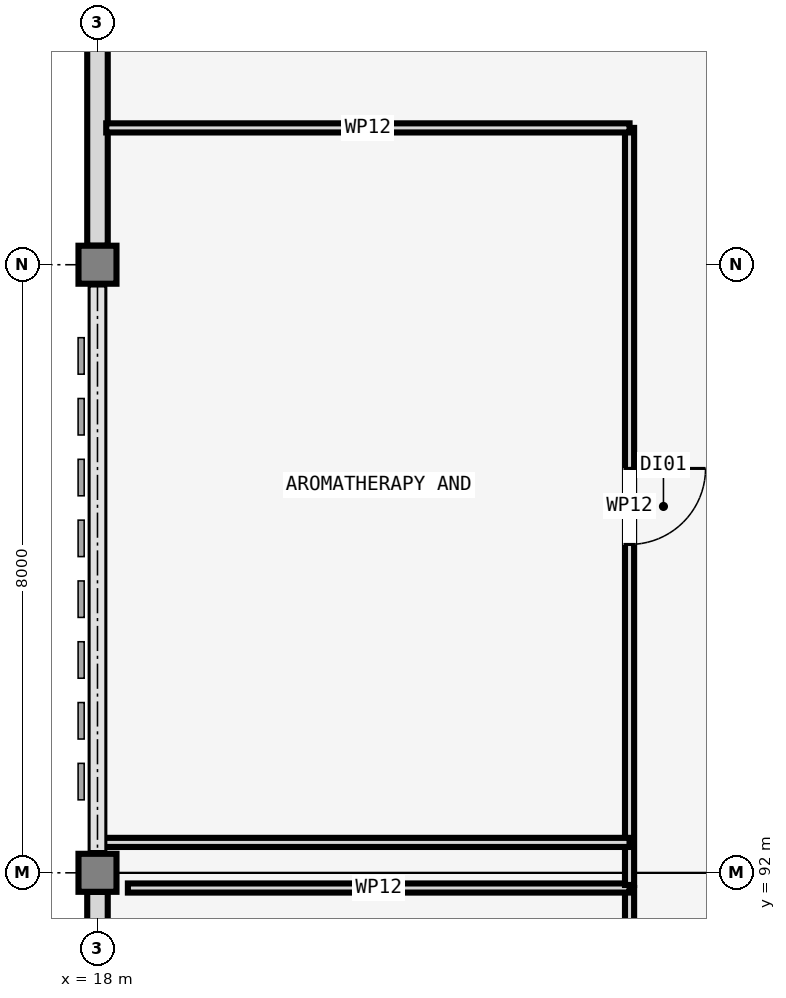
"""IFC4 building model, lengths in metres.
Left out: names, types, materials, properties, quantities, classifications, styles, units other than length and angle.
Written with IfcOpenShell. Run it as: python <this file> out.ifc"""

import sys

from ifc_helpers import new_model, si_unit, direction, frame, frame_2d, origin, origin_2d, place, context, subcontext, project, spatial, rectangle, extrude, element, fill, save


model = new_model("IFC4")
c1 = context("Model", 3, precision=1e-05, world=origin(), true_north=direction((0.0, 1.0)))
c2 = subcontext(c1, "Body", "Model", "MODEL_VIEW")
j1 = project(units=[si_unit("LENGTHUNIT", "METRE"), si_unit("PLANEANGLEUNIT", "RADIAN")], contexts=[c1])
p1 = place(None, origin())
s1 = spatial("IfcSite", under=j1, at=p1, CompositionType="ELEMENT")
p2 = place(p1, origin())
s2 = spatial("IfcBuilding", under=s1, at=p2, CompositionType="ELEMENT")
p3 = place(p2, frame((0.0, 0.0, 13.5)))
s3 = spatial("IfcBuildingStorey", under=s2, at=p3, CompositionType="ELEMENT", Elevation=13.5)
for number, where, z_axis, x_axis in (
    (1, (18.0, 92.0, 0.0), (0.0, 0.0, 1.0), (1.0, 0.0, 0.0)),
    (2, (18.0, 100.0, 0.0), (0.0, 0.0, 1.0), (1.0, 0.0, 0.0)),
):
    element("IfcColumn", number, at=place(p3, frame(where, z_axis=z_axis, x_axis=x_axis)), inside=s3, PredefinedType="COLUMN", context=c2, shape_type="SweptSolid", body=[
        extrude(rectangle(XDim=0.5, YDim=0.5, at=origin_2d()), origin(), (0.0, 0.0, 1.0), 4.2),
    ])
p4 = place(p3, frame((18.0, 91.75, 0.0), z_axis=(0.0, 0.0, 1.0), x_axis=(0.0, -1.0, 0.0)))
e3 = element("IfcWall", 3, at=p4, inside=s3, PredefinedType="SOLIDWALL", context=c2, shape_type="SweptSolid", body=[
    extrude(rectangle(XDim=7.5, YDim=0.27, at=frame_2d((3.75, 0.0))), origin(), (0.0, 0.0, 1.0), 3.24),
])
p5 = place(p4, frame((2.9, 0.0, 0.95)))
e4 = element("IfcOpeningElement", 4, at=p5, cuts=e3, PredefinedType="OPENING", context=c2, shape_type="SweptSolid", body=[
    extrude(rectangle(XDim=1.7, YDim=1.55, at=frame_2d((0.85, 0.775))), frame((0.0, 0.145, 0.0), z_axis=(0.0, -1.0, 0.0), x_axis=(1.0, 0.0, 0.0)), (0.0, 0.0, 1.0), 0.29),
])
p6 = place(p3, frame((18.0, 107.75, 0.0), z_axis=(0.0, 0.0, 1.0), x_axis=(0.0, -1.0, 0.0)))
e5 = element("IfcWall", 5, at=p6, inside=s3, PredefinedType="SOLIDWALL", context=c2, shape_type="SweptSolid", body=[
    extrude(rectangle(XDim=7.5, YDim=0.27, at=frame_2d((3.75, 0.0))), origin(), (0.0, 0.0, 1.0), 3.24),
])
p7 = place(p6, frame((2.9, 0.0, 0.95)))
e6 = element("IfcOpeningElement", 6, at=p7, cuts=e5, PredefinedType="OPENING", context=c2, shape_type="SweptSolid", body=[
    extrude(rectangle(XDim=1.7, YDim=1.55, at=frame_2d((0.85, 0.775))), frame((0.0, 0.145, 0.0), z_axis=(0.0, -1.0, 0.0), x_axis=(1.0, 0.0, 0.0)), (0.0, 0.0, 1.0), 0.29),
])
p8 = place(p3, frame((25.0, 91.8, 0.0), z_axis=(0.0, 0.0, 1.0), x_axis=(0.0, -1.0, 0.0)))
e7 = element("IfcWall", 7, at=p8, inside=s3, PredefinedType="PARTITIONING", context=c2, shape_type="SweptSolid", body=[
    extrude(rectangle(XDim=25.4, YDim=0.12, at=frame_2d((12.7, 0.0))), origin(), (0.0, 0.0, 1.0), 3.12),
])
p9 = place(p8, frame((12.2, 0.0, 0.0)))
e8 = element("IfcOpeningElement", 8, at=p9, cuts=e7, PredefinedType="OPENING", context=c2, shape_type="SweptSolid", body=[
    extrude(rectangle(XDim=1.0, YDim=2.1, at=frame_2d((0.5, 1.05))), frame((0.0, 0.07, 0.0), z_axis=(0.0, -1.0, 0.0), x_axis=(1.0, 0.0, 0.0)), (0.0, 0.0, 1.0), 0.14),
])
p10 = place(p3, frame((18.4, 91.8, 0.0), z_axis=(0.0, 0.0, 1.0), x_axis=(1.0, 0.0, 0.0)))
e9 = element("IfcWall", 9, at=p10, inside=s3, PredefinedType="PARTITIONING", context=c2, shape_type="SweptSolid", body=[
    extrude(rectangle(XDim=6.6, YDim=0.12, at=frame_2d((3.3, 0.0))), origin(), (0.0, 0.0, 1.0), 3.12),
])
p11 = place(p3, frame((25.0, 101.8, 0.0), z_axis=(0.0, 0.0, 1.0), x_axis=(0.0, -1.0, 0.0)))
e10 = element("IfcWall", 10, at=p11, inside=s3, PredefinedType="PARTITIONING", context=c2, shape_type="SweptSolid", body=[
    extrude(rectangle(XDim=9.96, YDim=0.12, at=frame_2d((4.98, 0.0))), origin(), (0.0, 0.0, 1.0), 3.12),
])
p12 = place(p11, frame((4.48, 0.0, 0.0)))
e11 = element("IfcOpeningElement", 11, at=p12, cuts=e10, PredefinedType="OPENING", context=c2, shape_type="SweptSolid", body=[
    extrude(rectangle(XDim=1.0, YDim=2.1, at=frame_2d((0.5, 1.05))), frame((0.0, 0.07, 0.0), z_axis=(0.0, -1.0, 0.0), x_axis=(1.0, 0.0, 0.0)), (0.0, 0.0, 1.0), 0.14),
])
p13 = place(p3, frame((18.115, 101.8, 0.0), z_axis=(0.0, 0.0, 1.0), x_axis=(1.0, 0.0, 0.0)))
e12 = element("IfcWall", 12, at=p13, inside=s3, PredefinedType="PARTITIONING", context=c2, shape_type="SweptSolid", body=[
    extrude(rectangle(XDim=6.885, YDim=0.12, at=frame_2d((3.442, 0.0))), origin(), (0.0, 0.0, 1.0), 3.12),
])
p14 = place(p3, frame((25.0, 92.4, 0.0), z_axis=(0.0, 0.0, 1.0), x_axis=(-1.0, 0.0, 0.0)))
e13 = element("IfcWall", 13, at=p14, inside=s3, PredefinedType="PARTITIONING", context=c2, shape_type="SweptSolid", body=[
    extrude(rectangle(XDim=6.949, YDim=0.12, at=frame_2d((3.475, 0.0))), origin(), (0.0, 0.0, 1.0), 3.12),
])
p15 = place(p12, origin())
e14 = element("IfcDoor", 14, at=p15, inside=s3, OperationType="SINGLE_SWING_LEFT", PredefinedType="DOOR", context=c2, shape_type="SweptSolid", body=[
    extrude(rectangle(XDim=1.0, YDim=2.1, at=frame_2d((0.5, 1.05))), frame((0.0, 0.025, 0.0), z_axis=(0.0, -1.0, 0.0), x_axis=(1.0, 0.0, 0.0)), (0.0, 0.0, 1.0), 0.05),
])
fill(e11, e14)
save(model, sys.argv[1])
